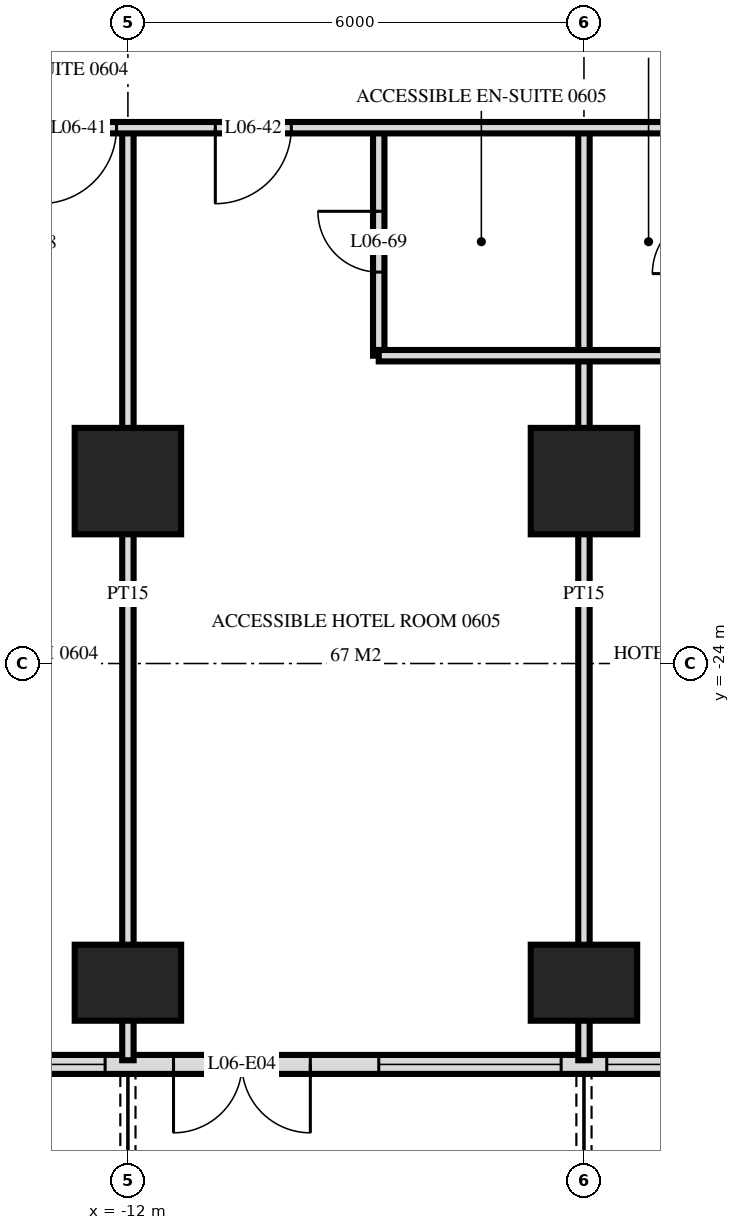
"""IFC4 building model, lengths in metres.
Left out: names, types, materials, properties, quantities, classifications, styles, units other than length and angle.
Written with IfcOpenShell. Run it as: python <this file> out.ifc"""

import sys

from ifc_helpers import new_model, si_unit, direction, frame, frame_2d, origin, origin_2d, place, context, subcontext, project, spatial, rectangle, extrude, element, fill, save


model = new_model("IFC4")
c1 = context("Model", 3, precision=1e-05, world=origin(), true_north=direction((0.0, 1.0)))
c2 = subcontext(c1, "Body", "Model", "MODEL_VIEW")
j1 = project(units=[si_unit("LENGTHUNIT", "METRE"), si_unit("PLANEANGLEUNIT", "RADIAN")], contexts=[c1])
p1 = place(None, origin())
s1 = spatial("IfcSite", under=j1, at=p1, CompositionType="ELEMENT")
p2 = place(p1, origin())
s2 = spatial("IfcBuilding", under=s1, at=p2, CompositionType="ELEMENT")
p3 = place(p2, frame((0.0, 0.0, 31.2)))
s3 = spatial("IfcBuildingStorey", under=s2, at=p3, CompositionType="ELEMENT", Elevation=31.2)
p4 = place(p3, frame((-12.0, -28.2, 0.0), z_axis=(0.0, 0.0, 1.0), x_axis=(1.0, 0.0, 0.0)))
e1 = element("IfcColumn", 1, at=p4, inside=s3, PredefinedType="COLUMN", context=c2, shape_type="SweptSolid", body=[
    extrude(rectangle(XDim=1.4, YDim=1.0, at=origin_2d()), origin(), (0.0, 0.0, 1.0), 3.6),
])
p5 = place(p3, frame((-12.0, -21.6, 0.0), z_axis=(0.0, 0.0, 1.0), x_axis=(1.0, 0.0, 0.0)))
e2 = element("IfcColumn", 2, at=p5, inside=s3, PredefinedType="COLUMN", context=c2, shape_type="SweptSolid", body=[
    extrude(rectangle(XDim=1.4, YDim=1.4, at=origin_2d()), origin(), (0.0, 0.0, 1.0), 3.6),
])
p6 = place(p3, frame((-6.0, -28.2, 0.0), z_axis=(0.0, 0.0, 1.0), x_axis=(1.0, 0.0, 0.0)))
e3 = element("IfcColumn", 3, at=p6, inside=s3, PredefinedType="COLUMN", context=c2, shape_type="SweptSolid", body=[
    extrude(rectangle(XDim=1.4, YDim=1.0, at=origin_2d()), origin(), (0.0, 0.0, 1.0), 3.6),
])
p7 = place(p3, frame((-6.0, -21.6, 0.0), z_axis=(0.0, 0.0, 1.0), x_axis=(1.0, 0.0, 0.0)))
e4 = element("IfcColumn", 4, at=p7, inside=s3, PredefinedType="COLUMN", context=c2, shape_type="SweptSolid", body=[
    extrude(rectangle(XDim=1.4, YDim=1.4, at=origin_2d()), origin(), (0.0, 0.0, 1.0), 3.6),
])
p8 = place(p3, frame((-28.775, -29.275, 0.0), z_axis=(0.0, 0.0, 1.0), x_axis=(1.0, 0.0, 0.0)))
e5 = element("IfcWall", 5, at=p8, inside=s3, PredefinedType="SOLIDWALL", context=c2, shape_type="SweptSolid", body=[
    extrude(rectangle(XDim=57.551, YDim=0.25, at=frame_2d((28.775, 0.0))), origin(), (0.0, 0.0, 1.0), 3.32),
])
p9 = place(p8, frame((0.575, 0.0, 0.0)))
e6 = element("IfcOpeningElement", 6, at=p9, cuts=e5, PredefinedType="OPENING", context=c2, shape_type="SweptSolid", body=[
    extrude(rectangle(XDim=1.8, YDim=2.4, at=frame_2d((0.9, 1.2))), frame((0.0, 0.135, 0.0), z_axis=(0.0, -1.0, 0.0), x_axis=(1.0, 0.0, 0.0)), (0.0, 0.0, 1.0), 0.27),
])
p10 = place(p8, frame((5.375, 0.0, 0.0)))
e7 = element("IfcOpeningElement", 7, at=p10, cuts=e5, PredefinedType="OPENING", context=c2, shape_type="SweptSolid", body=[
    extrude(rectangle(XDim=1.8, YDim=2.4, at=frame_2d((0.9, 1.2))), frame((0.0, 0.135, 0.0), z_axis=(0.0, -1.0, 0.0), x_axis=(1.0, 0.0, 0.0)), (0.0, 0.0, 1.0), 0.27),
])
p11 = place(p8, frame((8.075, 0.0, 0.3)))
e8 = element("IfcOpeningElement", 8, at=p11, cuts=e5, PredefinedType="OPENING", context=c2, shape_type="SweptSolid", body=[
    extrude(rectangle(XDim=2.4, YDim=2.1, at=frame_2d((1.2, 1.05))), frame((0.0, 0.135, 0.0), z_axis=(0.0, -1.0, 0.0), x_axis=(1.0, 0.0, 0.0)), (0.0, 0.0, 1.0), 0.27),
])
p12 = place(p8, frame((11.375, 0.0, 0.0)))
e9 = element("IfcOpeningElement", 9, at=p12, cuts=e5, PredefinedType="OPENING", context=c2, shape_type="SweptSolid", body=[
    extrude(rectangle(XDim=1.8, YDim=2.4, at=frame_2d((0.9, 1.2))), frame((0.0, 0.135, 0.0), z_axis=(0.0, -1.0, 0.0), x_axis=(1.0, 0.0, 0.0)), (0.0, 0.0, 1.0), 0.27),
])
p13 = place(p8, frame((14.075, 0.0, 0.3)))
e10 = element("IfcOpeningElement", 10, at=p13, cuts=e5, PredefinedType="OPENING", context=c2, shape_type="SweptSolid", body=[
    extrude(rectangle(XDim=2.4, YDim=2.1, at=frame_2d((1.2, 1.05))), frame((0.0, 0.135, 0.0), z_axis=(0.0, -1.0, 0.0), x_axis=(1.0, 0.0, 0.0)), (0.0, 0.0, 1.0), 0.27),
])
p14 = place(p8, frame((17.375, 0.0, 0.0)))
e11 = element("IfcOpeningElement", 11, at=p14, cuts=e5, PredefinedType="OPENING", context=c2, shape_type="SweptSolid", body=[
    extrude(rectangle(XDim=1.8, YDim=2.4, at=frame_2d((0.9, 1.2))), frame((0.0, 0.135, 0.0), z_axis=(0.0, -1.0, 0.0), x_axis=(1.0, 0.0, 0.0)), (0.0, 0.0, 1.0), 0.27),
])
p15 = place(p8, frame((20.075, 0.0, 0.3)))
e12 = element("IfcOpeningElement", 12, at=p15, cuts=e5, PredefinedType="OPENING", context=c2, shape_type="SweptSolid", body=[
    extrude(rectangle(XDim=2.4, YDim=2.1, at=frame_2d((1.2, 1.05))), frame((0.0, 0.135, 0.0), z_axis=(0.0, -1.0, 0.0), x_axis=(1.0, 0.0, 0.0)), (0.0, 0.0, 1.0), 0.27),
])
p16 = place(p8, frame((23.075, 0.0, 0.3)))
e13 = element("IfcOpeningElement", 13, at=p16, cuts=e5, PredefinedType="OPENING", context=c2, shape_type="SweptSolid", body=[
    extrude(rectangle(XDim=2.4, YDim=2.1, at=frame_2d((1.2, 1.05))), frame((0.0, 0.135, 0.0), z_axis=(0.0, -1.0, 0.0), x_axis=(1.0, 0.0, 0.0)), (0.0, 0.0, 1.0), 0.27),
])
p17 = place(p8, frame((26.375, 0.0, 0.0)))
e14 = element("IfcOpeningElement", 14, at=p17, cuts=e5, PredefinedType="OPENING", context=c2, shape_type="SweptSolid", body=[
    extrude(rectangle(XDim=1.8, YDim=2.4, at=frame_2d((0.9, 1.2))), frame((0.0, 0.135, 0.0), z_axis=(0.0, -1.0, 0.0), x_axis=(1.0, 0.0, 0.0)), (0.0, 0.0, 1.0), 0.27),
])
p18 = place(p8, frame((29.375, 0.0, 0.0)))
e15 = element("IfcOpeningElement", 15, at=p18, cuts=e5, PredefinedType="OPENING", context=c2, shape_type="SweptSolid", body=[
    extrude(rectangle(XDim=1.8, YDim=2.4, at=frame_2d((0.9, 1.2))), frame((0.0, 0.135, 0.0), z_axis=(0.0, -1.0, 0.0), x_axis=(1.0, 0.0, 0.0)), (0.0, 0.0, 1.0), 0.27),
])
p19 = place(p8, frame((32.075, 0.0, 0.3)))
e16 = element("IfcOpeningElement", 16, at=p19, cuts=e5, PredefinedType="OPENING", context=c2, shape_type="SweptSolid", body=[
    extrude(rectangle(XDim=2.4, YDim=2.1, at=frame_2d((1.2, 1.05))), frame((0.0, 0.135, 0.0), z_axis=(0.0, -1.0, 0.0), x_axis=(1.0, 0.0, 0.0)), (0.0, 0.0, 1.0), 0.27),
])
p20 = place(p8, frame((35.375, 0.0, 0.0)))
e17 = element("IfcOpeningElement", 17, at=p20, cuts=e5, PredefinedType="OPENING", context=c2, shape_type="SweptSolid", body=[
    extrude(rectangle(XDim=1.8, YDim=2.4, at=frame_2d((0.9, 1.2))), frame((0.0, 0.135, 0.0), z_axis=(0.0, -1.0, 0.0), x_axis=(1.0, 0.0, 0.0)), (0.0, 0.0, 1.0), 0.27),
])
p21 = place(p8, frame((38.075, 0.0, 0.3)))
e18 = element("IfcOpeningElement", 18, at=p21, cuts=e5, PredefinedType="OPENING", context=c2, shape_type="SweptSolid", body=[
    extrude(rectangle(XDim=2.4, YDim=2.1, at=frame_2d((1.2, 1.05))), frame((0.0, 0.135, 0.0), z_axis=(0.0, -1.0, 0.0), x_axis=(1.0, 0.0, 0.0)), (0.0, 0.0, 1.0), 0.27),
])
p22 = place(p8, frame((41.375, 0.0, 0.0)))
e19 = element("IfcOpeningElement", 19, at=p22, cuts=e5, PredefinedType="OPENING", context=c2, shape_type="SweptSolid", body=[
    extrude(rectangle(XDim=1.8, YDim=2.4, at=frame_2d((0.9, 1.2))), frame((0.0, 0.135, 0.0), z_axis=(0.0, -1.0, 0.0), x_axis=(1.0, 0.0, 0.0)), (0.0, 0.0, 1.0), 0.27),
])
p23 = place(p8, frame((44.075, 0.0, 0.3)))
e20 = element("IfcOpeningElement", 20, at=p23, cuts=e5, PredefinedType="OPENING", context=c2, shape_type="SweptSolid", body=[
    extrude(rectangle(XDim=2.4, YDim=2.1, at=frame_2d((1.2, 1.05))), frame((0.0, 0.135, 0.0), z_axis=(0.0, -1.0, 0.0), x_axis=(1.0, 0.0, 0.0)), (0.0, 0.0, 1.0), 0.27),
])
p24 = place(p8, frame((47.075, 0.0, 0.3)))
e21 = element("IfcOpeningElement", 21, at=p24, cuts=e5, PredefinedType="OPENING", context=c2, shape_type="SweptSolid", body=[
    extrude(rectangle(XDim=2.4, YDim=2.1, at=frame_2d((1.2, 1.05))), frame((0.0, 0.135, 0.0), z_axis=(0.0, -1.0, 0.0), x_axis=(1.0, 0.0, 0.0)), (0.0, 0.0, 1.0), 0.27),
])
p25 = place(p8, frame((50.375, 0.0, 0.0)))
e22 = element("IfcOpeningElement", 22, at=p25, cuts=e5, PredefinedType="OPENING", context=c2, shape_type="SweptSolid", body=[
    extrude(rectangle(XDim=1.8, YDim=2.4, at=frame_2d((0.9, 1.2))), frame((0.0, 0.135, 0.0), z_axis=(0.0, -1.0, 0.0), x_axis=(1.0, 0.0, 0.0)), (0.0, 0.0, 1.0), 0.27),
])
p26 = place(p8, frame((53.375, 0.0, 0.0)))
e23 = element("IfcOpeningElement", 23, at=p26, cuts=e5, PredefinedType="OPENING", context=c2, shape_type="SweptSolid", body=[
    extrude(rectangle(XDim=1.8, YDim=2.4, at=frame_2d((0.9, 1.2))), frame((0.0, 0.135, 0.0), z_axis=(0.0, -1.0, 0.0), x_axis=(1.0, 0.0, 0.0)), (0.0, 0.0, 1.0), 0.27),
])
p27 = place(p3, frame((-6.0, -29.22, 0.0), z_axis=(0.0, 0.0, 1.0), x_axis=(0.0, 1.0, 0.0)))
e24 = element("IfcWall", 24, at=p27, inside=s3, PredefinedType="PARTITIONING", context=c2, shape_type="SweptSolid", body=[
    extrude(rectangle(XDim=12.27, YDim=0.15, at=frame_2d((6.135, 0.0))), origin(), (0.0, 0.0, 1.0), 3.32),
])
p28 = place(p3, frame((-8.7, -19.95, 0.0), z_axis=(0.0, 0.0, 1.0), x_axis=(0.0, 1.0, 0.0)))
e25 = element("IfcWall", 25, at=p28, inside=s3, PredefinedType="PARTITIONING", context=c2, shape_type="SweptSolid", body=[
    extrude(rectangle(XDim=3.0, YDim=0.15, at=frame_2d((1.5, 0.0))), origin(), (0.0, 0.0, 1.0), 3.32),
])
p29 = place(p28, frame((1.1, 0.0, 0.0)))
e26 = element("IfcOpeningElement", 26, at=p29, cuts=e25, PredefinedType="OPENING", context=c2, shape_type="SweptSolid", body=[
    extrude(rectangle(XDim=0.8, YDim=2.1, at=frame_2d((0.4, 1.05))), frame((0.0, 0.085, 0.0), z_axis=(0.0, -1.0, 0.0), x_axis=(1.0, 0.0, 0.0)), (0.0, 0.0, 1.0), 0.17),
])
p30 = place(p3, frame((-12.0, -29.22, 0.0), z_axis=(0.0, 0.0, 1.0), x_axis=(0.0, 1.0, 0.0)))
e27 = element("IfcWall", 27, at=p30, inside=s3, PredefinedType="PARTITIONING", context=c2, shape_type="SweptSolid", body=[
    extrude(rectangle(XDim=12.27, YDim=0.15, at=frame_2d((6.135, 0.0))), origin(), (0.0, 0.0, 1.0), 3.32),
])
p31 = place(p3, frame((-8.7, -19.95, 0.0), z_axis=(0.0, 0.0, 1.0), x_axis=(1.0, 0.0, 0.0)))
e28 = element("IfcWall", 28, at=p31, inside=s3, PredefinedType="PARTITIONING", context=c2, shape_type="SweptSolid", body=[
    extrude(rectangle(XDim=4.4, YDim=0.15, at=frame_2d((2.2, 0.0))), origin(), (0.0, 0.0, 1.0), 3.32),
])
p32 = place(p3, frame((-33.12, -16.95, 0.0), z_axis=(0.0, 0.0, 1.0), x_axis=(1.0, 0.0, 0.0)))
e29 = element("IfcWall", 29, at=p32, inside=s3, PredefinedType="PARTITIONING", context=c2, shape_type="SweptSolid", body=[
    extrude(rectangle(XDim=66.24, YDim=0.15, at=frame_2d((33.12, 0.0))), origin(), (0.0, 0.0, 1.0), 3.32),
])
p33 = place(p32, frame((9.27, 0.0, 0.0)))
e30 = element("IfcOpeningElement", 30, at=p33, cuts=e29, PredefinedType="OPENING", context=c2, shape_type="SweptSolid", body=[
    extrude(rectangle(XDim=1.0, YDim=2.1, at=frame_2d((0.5, 1.05))), frame((0.0, 0.085, 0.0), z_axis=(0.0, -1.0, 0.0), x_axis=(1.0, 0.0, 0.0)), (0.0, 0.0, 1.0), 0.17),
])
p34 = place(p32, frame((13.97, 0.0, 0.0)))
e31 = element("IfcOpeningElement", 31, at=p34, cuts=e29, PredefinedType="OPENING", context=c2, shape_type="SweptSolid", body=[
    extrude(rectangle(XDim=1.0, YDim=2.1, at=frame_2d((0.5, 1.05))), frame((0.0, 0.085, 0.0), z_axis=(0.0, -1.0, 0.0), x_axis=(1.0, 0.0, 0.0)), (0.0, 0.0, 1.0), 0.17),
])
p35 = place(p32, frame((15.27, 0.0, 0.0)))
e32 = element("IfcOpeningElement", 32, at=p35, cuts=e29, PredefinedType="OPENING", context=c2, shape_type="SweptSolid", body=[
    extrude(rectangle(XDim=1.0, YDim=2.1, at=frame_2d((0.5, 1.05))), frame((0.0, 0.085, 0.0), z_axis=(0.0, -1.0, 0.0), x_axis=(1.0, 0.0, 0.0)), (0.0, 0.0, 1.0), 0.17),
])
p36 = place(p32, frame((19.97, 0.0, 0.0)))
e33 = element("IfcOpeningElement", 33, at=p36, cuts=e29, PredefinedType="OPENING", context=c2, shape_type="SweptSolid", body=[
    extrude(rectangle(XDim=1.0, YDim=2.1, at=frame_2d((0.5, 1.05))), frame((0.0, 0.085, 0.0), z_axis=(0.0, -1.0, 0.0), x_axis=(1.0, 0.0, 0.0)), (0.0, 0.0, 1.0), 0.17),
])
p37 = place(p32, frame((22.27, 0.0, 0.0)))
e34 = element("IfcOpeningElement", 34, at=p37, cuts=e29, PredefinedType="OPENING", context=c2, shape_type="SweptSolid", body=[
    extrude(rectangle(XDim=1.0, YDim=2.1, at=frame_2d((0.5, 1.05))), frame((0.0, 0.085, 0.0), z_axis=(0.0, -1.0, 0.0), x_axis=(1.0, 0.0, 0.0)), (0.0, 0.0, 1.0), 0.17),
])
p38 = place(p32, frame((28.97, 0.0, 0.0)))
e35 = element("IfcOpeningElement", 35, at=p38, cuts=e29, PredefinedType="OPENING", context=c2, shape_type="SweptSolid", body=[
    extrude(rectangle(XDim=1.0, YDim=2.1, at=frame_2d((0.5, 1.05))), frame((0.0, 0.085, 0.0), z_axis=(0.0, -1.0, 0.0), x_axis=(1.0, 0.0, 0.0)), (0.0, 0.0, 1.0), 0.17),
])
p39 = place(p32, frame((30.27, 0.0, 0.0)))
e36 = element("IfcOpeningElement", 36, at=p39, cuts=e29, PredefinedType="OPENING", context=c2, shape_type="SweptSolid", body=[
    extrude(rectangle(XDim=1.0, YDim=2.1, at=frame_2d((0.5, 1.05))), frame((0.0, 0.085, 0.0), z_axis=(0.0, -1.0, 0.0), x_axis=(1.0, 0.0, 0.0)), (0.0, 0.0, 1.0), 0.17),
])
p40 = place(p32, frame((34.97, 0.0, 0.0)))
e37 = element("IfcOpeningElement", 37, at=p40, cuts=e29, PredefinedType="OPENING", context=c2, shape_type="SweptSolid", body=[
    extrude(rectangle(XDim=1.0, YDim=2.1, at=frame_2d((0.5, 1.05))), frame((0.0, 0.085, 0.0), z_axis=(0.0, -1.0, 0.0), x_axis=(1.0, 0.0, 0.0)), (0.0, 0.0, 1.0), 0.17),
])
p41 = place(p32, frame((36.27, 0.0, 0.0)))
e38 = element("IfcOpeningElement", 38, at=p41, cuts=e29, PredefinedType="OPENING", context=c2, shape_type="SweptSolid", body=[
    extrude(rectangle(XDim=1.0, YDim=2.1, at=frame_2d((0.5, 1.05))), frame((0.0, 0.085, 0.0), z_axis=(0.0, -1.0, 0.0), x_axis=(1.0, 0.0, 0.0)), (0.0, 0.0, 1.0), 0.17),
])
p42 = place(p32, frame((40.97, 0.0, 0.0)))
e39 = element("IfcOpeningElement", 39, at=p42, cuts=e29, PredefinedType="OPENING", context=c2, shape_type="SweptSolid", body=[
    extrude(rectangle(XDim=1.0, YDim=2.1, at=frame_2d((0.5, 1.05))), frame((0.0, 0.085, 0.0), z_axis=(0.0, -1.0, 0.0), x_axis=(1.0, 0.0, 0.0)), (0.0, 0.0, 1.0), 0.17),
])
p43 = place(p32, frame((42.27, 0.0, 0.0)))
e40 = element("IfcOpeningElement", 40, at=p43, cuts=e29, PredefinedType="OPENING", context=c2, shape_type="SweptSolid", body=[
    extrude(rectangle(XDim=1.0, YDim=2.1, at=frame_2d((0.5, 1.05))), frame((0.0, 0.085, 0.0), z_axis=(0.0, -1.0, 0.0), x_axis=(1.0, 0.0, 0.0)), (0.0, 0.0, 1.0), 0.17),
])
p44 = place(p32, frame((46.97, 0.0, 0.0)))
e41 = element("IfcOpeningElement", 41, at=p44, cuts=e29, PredefinedType="OPENING", context=c2, shape_type="SweptSolid", body=[
    extrude(rectangle(XDim=1.0, YDim=2.1, at=frame_2d((0.5, 1.05))), frame((0.0, 0.085, 0.0), z_axis=(0.0, -1.0, 0.0), x_axis=(1.0, 0.0, 0.0)), (0.0, 0.0, 1.0), 0.17),
])
p45 = place(p32, frame((48.27, 0.0, 0.0)))
e42 = element("IfcOpeningElement", 42, at=p45, cuts=e29, PredefinedType="OPENING", context=c2, shape_type="SweptSolid", body=[
    extrude(rectangle(XDim=1.0, YDim=2.1, at=frame_2d((0.5, 1.05))), frame((0.0, 0.085, 0.0), z_axis=(0.0, -1.0, 0.0), x_axis=(1.0, 0.0, 0.0)), (0.0, 0.0, 1.0), 0.17),
])
p46 = place(p32, frame((52.97, 0.0, 0.0)))
e43 = element("IfcOpeningElement", 43, at=p46, cuts=e29, PredefinedType="OPENING", context=c2, shape_type="SweptSolid", body=[
    extrude(rectangle(XDim=1.0, YDim=2.1, at=frame_2d((0.5, 1.05))), frame((0.0, 0.085, 0.0), z_axis=(0.0, -1.0, 0.0), x_axis=(1.0, 0.0, 0.0)), (0.0, 0.0, 1.0), 0.17),
])
p47 = place(p32, frame((54.27, 0.0, 0.0)))
e44 = element("IfcOpeningElement", 44, at=p47, cuts=e29, PredefinedType="OPENING", context=c2, shape_type="SweptSolid", body=[
    extrude(rectangle(XDim=1.0, YDim=2.1, at=frame_2d((0.5, 1.05))), frame((0.0, 0.085, 0.0), z_axis=(0.0, -1.0, 0.0), x_axis=(1.0, 0.0, 0.0)), (0.0, 0.0, 1.0), 0.17),
])
p48 = place(p32, frame((4.4, 0.0, 0.0)))
e45 = element("IfcOpeningElement", 45, at=p48, cuts=e29, PredefinedType="OPENING", context=c2, shape_type="SweptSolid", body=[
    extrude(rectangle(XDim=1.0, YDim=2.1, at=frame_2d((0.5, 1.05))), frame((0.0, 0.085, 0.0), z_axis=(0.0, -1.0, 0.0), x_axis=(1.0, 0.0, 0.0)), (0.0, 0.0, 1.0), 0.17),
])
p49 = place(p32, frame((60.8, 0.0, 0.0)))
e46 = element("IfcOpeningElement", 46, at=p49, cuts=e29, PredefinedType="OPENING", context=c2, shape_type="SweptSolid", body=[
    extrude(rectangle(XDim=1.0, YDim=2.1, at=frame_2d((0.5, 1.05))), frame((0.0, 0.085, 0.0), z_axis=(0.0, -1.0, 0.0), x_axis=(1.0, 0.0, 0.0)), (0.0, 0.0, 1.0), 0.17),
])
p50 = place(p13, origin())
e47 = element("IfcWindow", 47, at=p50, inside=s3, PartitioningType="SINGLE_PANEL", PredefinedType="WINDOW", context=c2, shape_type="SweptSolid", body=[
    extrude(rectangle(XDim=2.4, YDim=2.1, at=frame_2d((1.2, 1.05))), frame((0.0, 0.03, 0.0), z_axis=(0.0, -1.0, 0.0), x_axis=(1.0, 0.0, 0.0)), (0.0, 0.0, 1.0), 0.06),
])
fill(e10, e47)
p51 = place(p14, frame((0.9, 0.0, 0.0), z_axis=(0.0, 0.0, 1.0), x_axis=(-1.0, 0.0, 0.0)))
e48 = element("IfcDoor", 48, at=p51, inside=s3, OperationType="DOUBLE_DOOR_SINGLE_SWING", PredefinedType="DOOR", context=c2, shape_type="SweptSolid", body=[
    extrude(rectangle(XDim=1.8, YDim=2.4, at=frame_2d((0.0, 1.2))), frame((0.0, -0.025, 0.0), z_axis=(0.0, 1.0, 0.0), x_axis=(-1.0, 0.0, 0.0)), (0.0, 0.0, 1.0), 0.05),
])
fill(e11, e48)
p52 = place(p15, origin())
e49 = element("IfcWindow", 49, at=p52, inside=s3, PartitioningType="SINGLE_PANEL", PredefinedType="WINDOW", context=c2, shape_type="SweptSolid", body=[
    extrude(rectangle(XDim=2.4, YDim=2.1, at=frame_2d((1.2, 1.05))), frame((0.0, 0.03, 0.0), z_axis=(0.0, -1.0, 0.0), x_axis=(1.0, 0.0, 0.0)), (0.0, 0.0, 1.0), 0.06),
])
fill(e12, e49)
p53 = place(p16, origin())
e50 = element("IfcWindow", 50, at=p53, inside=s3, PartitioningType="SINGLE_PANEL", PredefinedType="WINDOW", context=c2, shape_type="SweptSolid", body=[
    extrude(rectangle(XDim=2.4, YDim=2.1, at=frame_2d((1.2, 1.05))), frame((0.0, 0.03, 0.0), z_axis=(0.0, -1.0, 0.0), x_axis=(1.0, 0.0, 0.0)), (0.0, 0.0, 1.0), 0.06),
])
fill(e13, e50)
p54 = place(p36, frame((0.5, 0.0, 0.0), z_axis=(0.0, 0.0, 1.0), x_axis=(-1.0, 0.0, 0.0)))
e51 = element("IfcDoor", 51, at=p54, inside=s3, OperationType="SINGLE_SWING_LEFT", PredefinedType="DOOR", context=c2, shape_type="SweptSolid", body=[
    extrude(rectangle(XDim=1.0, YDim=2.1, at=frame_2d((0.0, 1.05))), frame((0.0, -0.025, 0.0), z_axis=(0.0, 1.0, 0.0), x_axis=(-1.0, 0.0, 0.0)), (0.0, 0.0, 1.0), 0.05),
])
fill(e33, e51)
p55 = place(p37, frame((0.5, 0.0, 0.0), z_axis=(0.0, 0.0, 1.0), x_axis=(-1.0, 0.0, 0.0)))
e52 = element("IfcDoor", 52, at=p55, inside=s3, OperationType="SINGLE_SWING_LEFT", PredefinedType="DOOR", context=c2, shape_type="SweptSolid", body=[
    extrude(rectangle(XDim=1.0, YDim=2.1, at=frame_2d((0.0, 1.05))), frame((0.0, -0.025, 0.0), z_axis=(0.0, 1.0, 0.0), x_axis=(-1.0, 0.0, 0.0)), (0.0, 0.0, 1.0), 0.05),
])
fill(e34, e52)
p56 = place(p29, origin())
e53 = element("IfcDoor", 53, at=p56, inside=s3, OperationType="SINGLE_SWING_LEFT", PredefinedType="DOOR", context=c2, shape_type="SweptSolid", body=[
    extrude(rectangle(XDim=0.8, YDim=2.1, at=frame_2d((0.4, 1.05))), frame((0.0, 0.025, 0.0), z_axis=(0.0, -1.0, 0.0), x_axis=(1.0, 0.0, 0.0)), (0.0, 0.0, 1.0), 0.05),
])
fill(e26, e53)
save(model, sys.argv[1])
